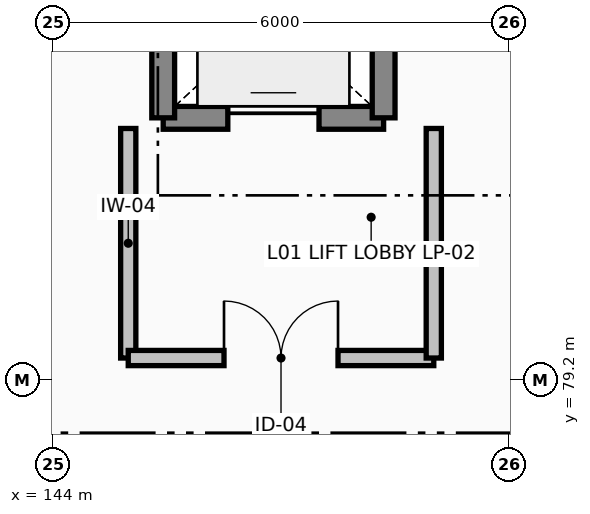
"""IFC4 building model, lengths in metres.
Left out: names, types, materials, properties, quantities, classifications, styles, units other than length and angle.
Written with IfcOpenShell. Run it as: python <this file> out.ifc"""

import sys

from ifc_helpers import new_model, si_unit, direction, frame, frame_2d, origin, place, context, subcontext, project, spatial, rectangle, extrude, element, fill, save


model = new_model("IFC4")
c1 = context("Model", 3, precision=1e-05, world=origin(), true_north=direction((0.0, 1.0)))
c2 = subcontext(c1, "Body", "Model", "MODEL_VIEW")
j1 = project(units=[si_unit("LENGTHUNIT", "METRE"), si_unit("PLANEANGLEUNIT", "RADIAN")], contexts=[c1])
p1 = place(None, origin())
s1 = spatial("IfcSite", under=j1, at=p1, CompositionType="ELEMENT")
p2 = place(p1, origin())
s2 = spatial("IfcBuilding", under=s1, at=p2, CompositionType="ELEMENT")
p3 = place(p2, frame((0.0, 0.0, 5.76)))
s3 = spatial("IfcBuildingStorey", under=s2, at=p3, CompositionType="ELEMENT", Elevation=5.76)
p4 = place(p3, frame((145.45, 82.65, 0.0), z_axis=(0.0, 0.0, 1.0), x_axis=(1.0, 0.0, 0.0)))
e1 = element("IfcWall", 1, at=p4, inside=s3, PredefinedType="SHEAR", context=c2, shape_type="SweptSolid", body=[
    extrude(rectangle(XDim=2.9, YDim=0.3, at=frame_2d((1.45, 0.0))), origin(), (0.0, 0.0, 1.0), 3.78),
])
p5 = place(p4, frame((0.85, 0.0, 0.0)))
e2 = element("IfcOpeningElement", 2, at=p5, cuts=e1, PredefinedType="OPENING", context=c2, shape_type="SweptSolid", body=[
    extrude(rectangle(XDim=1.2, YDim=2.15, at=frame_2d((0.6, 1.075))), frame((0.0, 0.16, 0.0), z_axis=(0.0, -1.0, 0.0), x_axis=(1.0, 0.0, 0.0)), (0.0, 0.0, 1.0), 0.32),
])
for number, where, z_axis, x_axis in (
    (3, (145.45, 82.65, 0.0), (0.0, 0.0, 1.0), (0.0, 1.0, 0.0)),
    (4, (148.35, 82.65, 0.0), (0.0, 0.0, 1.0), (0.0, 1.0, 0.0)),
):
    element("IfcWall", number, at=place(p3, frame(where, z_axis=z_axis, x_axis=x_axis)), inside=s3, PredefinedType="SHEAR", context=c2, shape_type="SweptSolid", body=[
        extrude(rectangle(XDim=2.7, YDim=0.3, at=frame_2d((1.35, 0.0))), origin(), (0.0, 0.0, 1.0), 3.78),
    ])
p6 = place(p3, frame((144.99, 82.51, 0.0), z_axis=(0.0, 0.0, 1.0), x_axis=(0.0, -1.0, 0.0)))
e5 = element("IfcWall", 5, at=p6, inside=s3, PredefinedType="PARTITIONING", context=c2, shape_type="SweptSolid", body=[
    extrude(rectangle(XDim=3.02, YDim=0.2, at=frame_2d((1.51, 0.0))), origin(), (0.0, 0.0, 1.0), 3.82),
])
p7 = place(p3, frame((144.99, 79.49, 0.0), z_axis=(0.0, 0.0, 1.0), x_axis=(1.0, 0.0, 0.0)))
e6 = element("IfcWall", 6, at=p7, inside=s3, PredefinedType="PARTITIONING", context=c2, shape_type="SweptSolid", body=[
    extrude(rectangle(XDim=4.02, YDim=0.2, at=frame_2d((2.01, 0.0))), origin(), (0.0, 0.0, 1.0), 3.82),
])
p8 = place(p7, frame((1.26, 0.0, 0.0)))
e7 = element("IfcOpeningElement", 7, at=p8, cuts=e6, PredefinedType="OPENING", context=c2, shape_type="SweptSolid", body=[
    extrude(rectangle(XDim=1.5, YDim=2.2, at=frame_2d((0.75, 1.1))), frame((0.0, 0.11, 0.0), z_axis=(0.0, -1.0, 0.0), x_axis=(1.0, 0.0, 0.0)), (0.0, 0.0, 1.0), 0.22),
])
p9 = place(p3, frame((149.01, 79.49, 0.0), z_axis=(0.0, 0.0, 1.0), x_axis=(0.0, 1.0, 0.0)))
e8 = element("IfcWall", 8, at=p9, inside=s3, PredefinedType="PARTITIONING", context=c2, shape_type="SweptSolid", body=[
    extrude(rectangle(XDim=3.02, YDim=0.2, at=frame_2d((1.51, 0.0))), origin(), (0.0, 0.0, 1.0), 3.82),
])
p10 = place(p5, origin())
e9 = element("IfcDoor", 9, at=p10, inside=s3, OperationType="SLIDING_TO_LEFT", PredefinedType="DOOR", context=c2, shape_type="SweptSolid", body=[
    extrude(rectangle(XDim=1.2, YDim=2.15, at=frame_2d((0.6, 1.075))), frame((0.0, 0.025, 0.0), z_axis=(0.0, -1.0, 0.0), x_axis=(1.0, 0.0, 0.0)), (0.0, 0.0, 1.0), 0.05),
])
fill(e2, e9)
p11 = place(p8, origin())
e10 = element("IfcDoor", 10, at=p11, inside=s3, OperationType="DOUBLE_SWING_LEFT", PredefinedType="DOOR", context=c2, shape_type="SweptSolid", body=[
    extrude(rectangle(XDim=1.5, YDim=2.2, at=frame_2d((0.75, 1.1))), frame((0.0, 0.025, 0.0), z_axis=(0.0, -1.0, 0.0), x_axis=(1.0, 0.0, 0.0)), (0.0, 0.0, 1.0), 0.05),
])
fill(e7, e10)
save(model, sys.argv[1])
